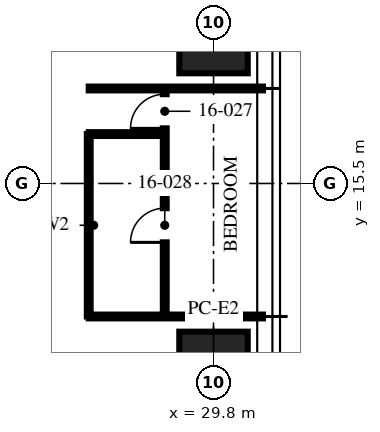
"""IFC4 building model, lengths in metres.
Left out: names, types, materials, properties, quantities, classifications, styles, units other than length and angle.
Written with IfcOpenShell. Run it as: python <this file> out.ifc"""

import sys

from ifc_helpers import new_model, si_unit, direction, frame, frame_2d, origin, origin_2d, place, context, subcontext, project, spatial, rectangle, hollow_rectangle, extrude, element, fill, save


model = new_model("IFC4")
c1 = context("Model", 3, precision=1e-05, world=origin(), true_north=direction((0.0, 1.0)))
c2 = subcontext(c1, "Body", "Model", "MODEL_VIEW")
j1 = project(units=[si_unit("LENGTHUNIT", "METRE"), si_unit("PLANEANGLEUNIT", "RADIAN")], contexts=[c1])
p1 = place(None, origin())
s1 = spatial("IfcSite", under=j1, at=p1, CompositionType="ELEMENT")
p2 = place(p1, origin())
s2 = spatial("IfcBuilding", under=s1, at=p2, CompositionType="ELEMENT")
p3 = place(p2, frame((0.0, 0.0, 66.0)))
s3 = spatial("IfcBuildingStorey", under=s2, at=p3, CompositionType="ELEMENT", Elevation=66.0)
for number, where, z_axis, x_axis in (
    (1, (29.8, 20.0, 0.0), (0.0, 0.0, 1.0), (0.0, 1.0, 0.0)),
    (2, (29.8, 10.0, 0.0), (0.0, 0.0, 1.0), (0.0, 1.0, 0.0)),
):
    element("IfcColumn", number, at=place(p3, frame(where, z_axis=z_axis, x_axis=x_axis)), inside=s3, PredefinedType="COLUMN", context=c2, shape_type="SweptSolid", body=[
        extrude(hollow_rectangle(XDim=3.2, YDim=1.8, WallThickness=0.2, at=origin_2d()), origin(), (0.0, 0.0, 1.0), 3.75),
    ])
for number, where, z_axis, x_axis in (
    (3, (26.517, 12.0, 0.0), (0.0, 0.0, 1.0), (1.0, 0.0, 0.0)),
    (4, (26.517, 18.0, 0.0), (0.0, 0.0, 1.0), (1.0, 0.0, 0.0)),
):
    element("IfcWall", number, at=place(p3, frame(where, z_axis=z_axis, x_axis=x_axis)), inside=s3, PredefinedType="PARTITIONING", context=c2, shape_type="SweptSolid", body=[
        extrude(rectangle(XDim=4.583, YDim=0.1, at=frame_2d((2.292, 0.0))), origin(), (0.0, 0.0, 1.0), 2.71),
    ])
p4 = place(p3, frame((28.517, 12.0, 0.0), z_axis=(0.0, 0.0, 1.0), x_axis=(0.0, 1.0, 0.0)))
e5 = element("IfcWall", 5, at=p4, inside=s3, PredefinedType="PARTITIONING", context=c2, shape_type="SweptSolid", body=[
    extrude(rectangle(XDim=6.0, YDim=0.1, at=frame_2d((3.0, 0.0))), origin(), (0.0, 0.0, 1.0), 2.61),
])
p5 = place(p4, frame((4.95, 0.0, 0.0)))
e6 = element("IfcOpeningElement", 6, at=p5, cuts=e5, PredefinedType="OPENING", context=c2, shape_type="SweptSolid", body=[
    extrude(rectangle(XDim=0.9, YDim=2.1, at=frame_2d((0.45, 1.05))), frame((0.0, 0.06, 0.0), z_axis=(0.0, -1.0, 0.0), x_axis=(1.0, 0.0, 0.0)), (0.0, 0.0, 1.0), 0.12),
])
p6 = place(p4, frame((1.95, 0.0, 0.0)))
e7 = element("IfcOpeningElement", 7, at=p6, cuts=e5, PredefinedType="OPENING", context=c2, shape_type="SweptSolid", body=[
    extrude(rectangle(XDim=0.9, YDim=2.1, at=frame_2d((0.45, 1.05))), frame((0.0, 0.06, 0.0), z_axis=(0.0, -1.0, 0.0), x_axis=(1.0, 0.0, 0.0)), (0.0, 0.0, 1.0), 0.12),
])
p7 = place(p3, frame((26.517, 16.8, 0.0), z_axis=(0.0, 0.0, 1.0), x_axis=(1.0, 0.0, 0.0)))
e8 = element("IfcWall", 8, at=p7, inside=s3, PredefinedType="PARTITIONING", context=c2, shape_type="SweptSolid", body=[
    extrude(rectangle(XDim=2.0, YDim=0.1, at=frame_2d((1.0, 0.0))), origin(), (0.0, 0.0, 1.0), 3.5),
])
p8 = place(p3, frame((26.517, 12.0, 0.0), z_axis=(0.0, 0.0, 1.0), x_axis=(0.0, 1.0, 0.0)))
e9 = element("IfcWall", 9, at=p8, inside=s3, PredefinedType="PARTITIONING", context=c2, shape_type="SweptSolid", body=[
    extrude(rectangle(XDim=4.8, YDim=0.1, at=frame_2d((2.4, 0.0))), origin(), (0.0, 0.0, 1.0), 2.61),
])
p9 = place(p5, origin())
e10 = element("IfcDoor", 10, at=p9, inside=s3, OperationType="SINGLE_SWING_LEFT", PredefinedType="DOOR", context=c2, shape_type="SweptSolid", body=[
    extrude(rectangle(XDim=0.9, YDim=2.1, at=frame_2d((0.45, 1.05))), frame((0.0, 0.025, 0.0), z_axis=(0.0, -1.0, 0.0), x_axis=(1.0, 0.0, 0.0)), (0.0, 0.0, 1.0), 0.05),
])
fill(e6, e10)
p10 = place(p6, origin())
e11 = element("IfcDoor", 11, at=p10, inside=s3, OperationType="SINGLE_SWING_LEFT", PredefinedType="DOOR", context=c2, shape_type="SweptSolid", body=[
    extrude(rectangle(XDim=0.9, YDim=2.1, at=frame_2d((0.45, 1.05))), frame((0.0, 0.025, 0.0), z_axis=(0.0, -1.0, 0.0), x_axis=(1.0, 0.0, 0.0)), (0.0, 0.0, 1.0), 0.05),
])
fill(e7, e11)
save(model, sys.argv[1])
